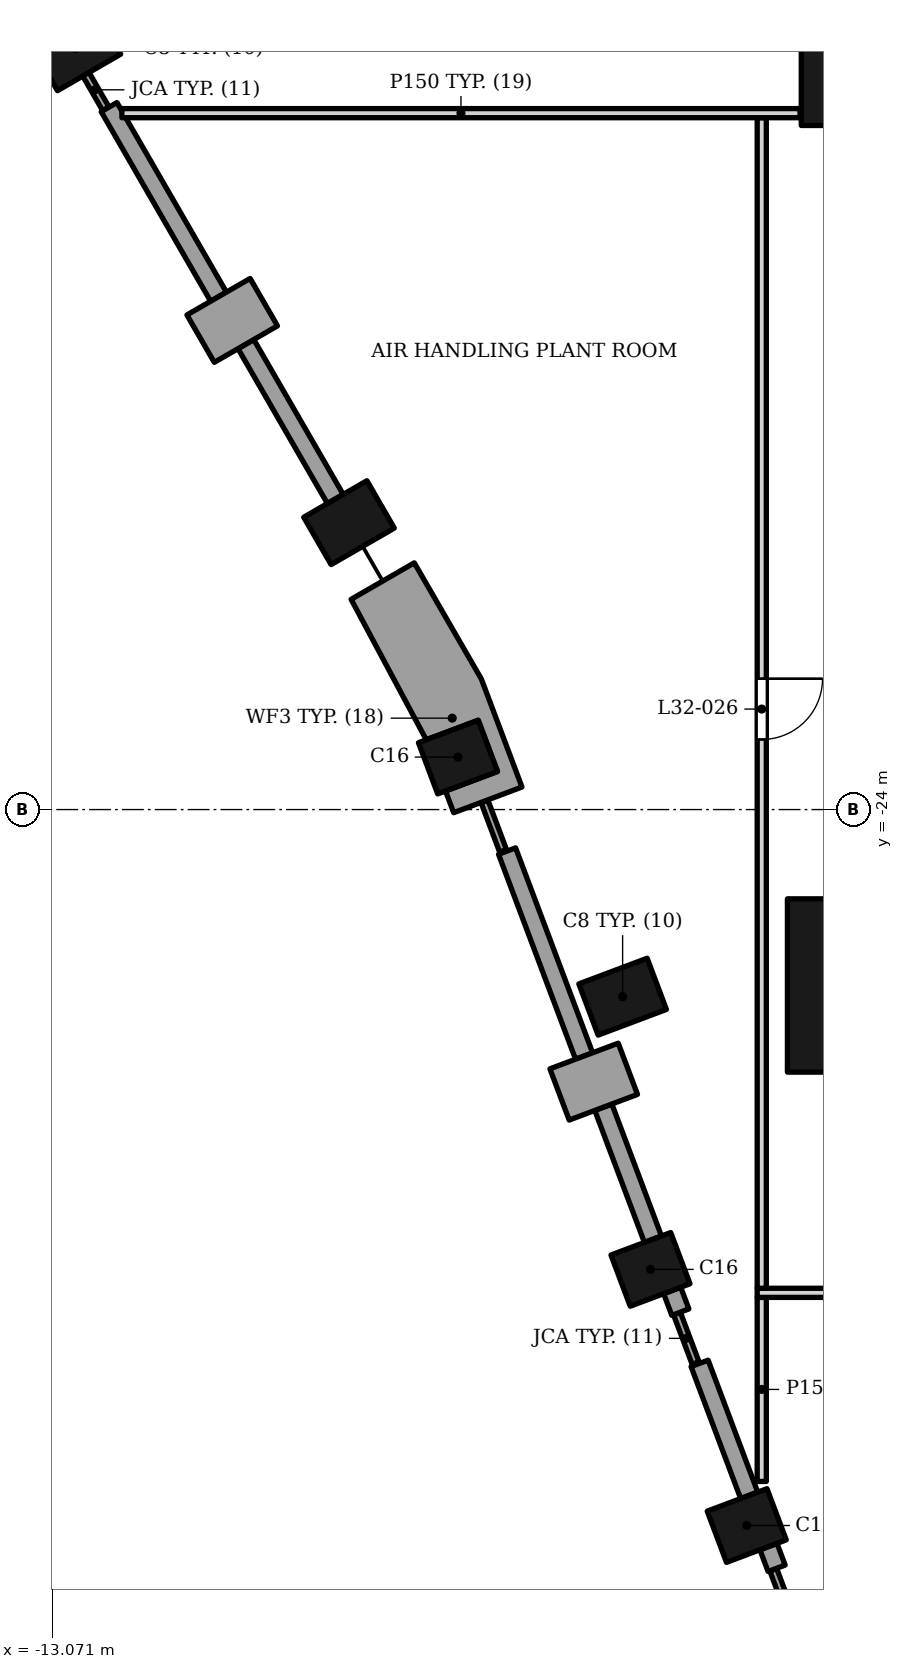
"""IFC4 building model, lengths in metres.
Left out: names, types, materials, properties, quantities, classifications, styles, units other than length and angle.
Written with IfcOpenShell. Run it as: python <this file> out.ifc"""

import sys

from ifc_helpers import new_model, si_unit, direction, frame, frame_2d, origin, origin_2d, place, context, subcontext, project, spatial, polyline, rectangle, outline, extrude, element, fill, save


model = new_model("IFC4")
c1 = context("Model", 3, precision=1e-05, world=origin(), true_north=direction((0.0, 1.0)))
c2 = subcontext(c1, "Body", "Model", "MODEL_VIEW")
j1 = project(units=[si_unit("LENGTHUNIT", "METRE"), si_unit("PLANEANGLEUNIT", "RADIAN")], contexts=[c1])
p1 = place(None, origin())
s1 = spatial("IfcSite", under=j1, at=p1, CompositionType="ELEMENT")
p2 = place(p1, origin())
s2 = spatial("IfcBuilding", under=s1, at=p2, CompositionType="ELEMENT")
p3 = place(p2, frame((0.0, 0.0, 139.6)))
s3 = spatial("IfcBuildingStorey", under=s2, at=p3, CompositionType="ELEMENT", Elevation=139.6)
for number, where, z_axis, x_axis in (
    (1, (-12.688, -11.488, 0.0), (0.0, 0.0, 1.0), (0.5, -0.866, 0.0)),
    (2, (-8.188, -19.282, 0.0), (0.0, 0.0, 1.0), (0.5, -0.866, 0.0)),
    (3, (-3.688, -27.077, 0.0), (0.0, 0.0, 1.0), (0.352, -0.936, 0.0)),
):
    element("IfcColumn", number, at=place(p3, frame(where, z_axis=z_axis, x_axis=x_axis)), inside=s3, PredefinedType="COLUMN", context=c2, shape_type="SweptSolid", body=[
        extrude(rectangle(XDim=0.9, YDim=1.2, at=origin_2d()), origin(), (0.0, 0.0, 1.0), 5.0),
    ])
p4 = place(p3, frame((0.447, -26.893, 0.0), z_axis=(0.0, 0.0, 1.0), x_axis=(0.0, 1.0, 0.0)))
e4 = element("IfcColumn", 4, at=p4, inside=s3, PredefinedType="COLUMN", context=c2, shape_type="SweptSolid", body=[
    extrude(rectangle(XDim=2.85, YDim=2.85, at=origin_2d()), origin(), (0.0, 0.0, 1.0), 5.0),
])
p5 = place(p3, frame((0.0, -12.0, 0.0), z_axis=(0.0, 0.0, 1.0), x_axis=(1.0, 0.0, 0.0)))
e5 = element("IfcColumn", 5, at=p5, inside=s3, PredefinedType="COLUMN", context=c2, shape_type="SweptSolid", body=[
    extrude(rectangle(XDim=1.5, YDim=1.5, at=origin_2d()), origin(), (0.0, 0.0, 1.0), 5.0),
])
for number, where, z_axis, x_axis in (
    (6, (-6.396, -23.137, 0.0), (0.0, 0.0, 1.0), (0.352, -0.936, 0.0)),
    (7, (-3.23, -31.562, 0.0), (0.0, 0.0, 1.0), (0.352, -0.936, 0.0)),
    (8, (-1.647, -35.774, 0.0), (0.0, 0.0, 1.0), (0.352, -0.936, 0.0)),
):
    element("IfcColumn", number, at=place(p3, frame(where, z_axis=z_axis, x_axis=x_axis)), inside=s3, PredefinedType="COLUMN", context=c2, shape_type="SweptSolid", body=[
        extrude(rectangle(XDim=0.9, YDim=1.05, at=origin_2d()), origin(), (0.0, 0.0, 1.0), 5.0),
    ])
p6 = place(p3, frame((-9.589, -15.656, 0.0), z_axis=(0.0, 0.0, 1.0), x_axis=(-0.866043267704, -0.499969057507, 0.0)))
e9 = element("IfcWall", 9, at=p6, inside=s3, PredefinedType="SOLIDWALL", context=c2, shape_type="SweptSolid", body=[
    extrude(rectangle(XDim=1.2, YDim=0.9, at=frame_2d((0.6, 0.0))), origin(), (0.0, 0.0, 1.0), 3.5),
])
p7 = place(p3, frame((-12.134, -12.448, 0.0), z_axis=(0.0, 0.0, 1.0), x_axis=(0.500012057535, -0.866018442252, 0.0)))
e10 = element("IfcWall", 10, at=p7, inside=s3, PredefinedType="ELEMENTEDWALL", context=c2, shape_type="SweptSolid", body=[
    extrude(rectangle(XDim=3.6, YDim=0.3, at=frame_2d((1.8, 0.0))), origin(), (0.0, 0.0, 1.0), 3.5),
])
p8 = place(p3, origin())
e11 = element("IfcWall", 11, at=p8, inside=s3, PredefinedType="ELEMENTEDWALL", context=c2, shape_type="SweptSolid", body=[
    extrude(outline(polyline([(-10.014, -16.42), (-8.543, -18.968), (-8.283, -18.817), (-9.754, -16.271), (-10.014, -16.42)])), origin(), (0.0, 0.0, 1.0), 3.5),
])
p9 = place(p3, frame((-4.725, -28.685, 0.0), z_axis=(0.0, 0.0, 1.0), x_axis=(0.936086483131, 0.351769947693, 0.0)))
e12 = element("IfcWall", 12, at=p9, inside=s3, PredefinedType="SOLIDWALL", context=c2, shape_type="SweptSolid", body=[
    extrude(rectangle(XDim=1.2, YDim=0.9, at=frame_2d((0.6, 0.0))), origin(), (0.0, 0.0, 1.0), 3.5),
])
p10 = place(p3, frame((-5.589, -24.683, 0.0), z_axis=(0.0, 0.0, 1.0), x_axis=(0.351851706772, -0.936055754986, 0.0)))
e13 = element("IfcWall", 13, at=p10, inside=s3, PredefinedType="ELEMENTEDWALL", context=c2, shape_type="SweptSolid", body=[
    extrude(rectangle(XDim=3.6, YDim=0.3, at=frame_2d((1.8, 0.0))), origin(), (0.0, 0.0, 1.0), 3.5),
])
p11 = place(p3, origin())
e14 = element("IfcWall", 14, at=p11, inside=s3, PredefinedType="ELEMENTEDWALL", context=c2, shape_type="SweptSolid", body=[
    extrude(outline(polyline([(-4.146, -28.948), (-3.33, -31.119), (-3.049, -31.013), (-3.865, -28.843), (-4.146, -28.948)])), origin(), (0.0, 0.0, 1.0), 3.5),
])
p12 = place(p3, origin())
e15 = element("IfcWall", 15, at=p12, inside=s3, PredefinedType="ELEMENTEDWALL", context=c2, shape_type="SweptSolid", body=[
    extrude(outline(polyline([(-2.598, -32.212), (-2.732, -31.856), (-3.013, -31.961), (-2.879, -32.318), (-2.598, -32.212)])), origin(), (0.0, 0.0, 1.0), 3.5),
])
p13 = place(p3, origin())
e16 = element("IfcWall", 16, at=p13, inside=s3, PredefinedType="ELEMENTEDWALL", context=c2, shape_type="SweptSolid", body=[
    extrude(outline(polyline([(-2.562, -33.16), (-1.747, -35.331), (-1.466, -35.225), (-2.282, -33.055), (-2.562, -33.16)])), origin(), (0.0, 0.0, 1.0), 3.5),
])
p14 = place(p3, origin())
e17 = element("IfcWall", 17, at=p14, inside=s3, PredefinedType="ELEMENTEDWALL", context=c2, shape_type="SweptSolid", body=[
    extrude(outline(polyline([(-1.015, -36.425), (-1.149, -36.068), (-1.43, -36.173), (-1.296, -36.53), (-1.015, -36.425)])), origin(), (0.0, 0.0, 1.0), 3.5),
])
p15 = place(p3, origin())
e18 = element("IfcWall", 18, at=p15, inside=s3, PredefinedType="SOLIDWALL", context=c2, shape_type="SweptSolid", body=[
    extrude(outline(polyline([(-7.114, -19.943), (-8.154, -20.542), (-6.918, -22.852), (-6.063, -22.531), (-5.746, -23.374), (-6.601, -23.695), (-6.467, -24.052), (-5.344, -23.629), (-6.011, -21.853), (-7.114, -19.943)])), origin(), (0.0, 0.0, 1.0), 3.5),
])
p16 = place(p3, frame((-12.188, -12.475, 0.0), z_axis=(0.0, 0.0, 1.0), x_axis=(-0.499898722045, 0.866083868743, 0.0)))
e19 = element("IfcWall", 19, at=p16, inside=s3, PredefinedType="SOLIDWALL", context=c2, shape_type="SweptSolid", body=[
    extrude(rectangle(XDim=0.719, YDim=0.12, at=frame_2d((0.36, 0.0))), origin(), (0.0, 0.0, 1.0), 3.5),
])
for number, where, z_axis, x_axis in (
    (20, (-5.96, -23.865, 0.0), (0.0, 0.0, 1.0), (0.352, -0.936, 0.0)),
    (21, (-2.793, -32.29, 0.0), (0.0, 0.0, 1.0), (0.352, -0.936, 0.0)),
):
    element("IfcWall", number, at=place(p3, frame(where, z_axis=z_axis, x_axis=x_axis)), inside=s3, PredefinedType="SOLIDWALL", context=c2, shape_type="SweptSolid", body=[
        extrude(rectangle(XDim=0.868, YDim=0.12, at=frame_2d((0.434, 0.0))), origin(), (0.0, 0.0, 1.0), 3.5),
    ])
p17 = place(p3, frame((-1.21, -36.502, 0.0), z_axis=(0.0, 0.0, 1.0), x_axis=(0.351957262509, -0.936016071105, 0.0)))
e22 = element("IfcWall", 22, at=p17, inside=s3, PredefinedType="SOLIDWALL", context=c2, shape_type="SweptSolid", body=[
    extrude(rectangle(XDim=0.898, YDim=0.12, at=frame_2d((0.449, 0.0))), origin(), (0.0, 0.0, 1.0), 3.5),
])
p18 = place(p3, frame((-1.4, -35.05, 0.0), z_axis=(0.0, 0.0, 1.0), x_axis=(0.0, 1.0, 0.0)))
e23 = element("IfcWall", 23, at=p18, inside=s3, PredefinedType="PARTITIONING", context=c2, shape_type="SweptSolid", body=[
    extrude(rectangle(XDim=3.027, YDim=0.15, at=frame_2d((1.514, 0.0))), origin(), (0.0, 0.0, 1.0), 4.13),
])
p19 = place(p3, frame((-1.475, -31.948, 0.0), z_axis=(0.0, 0.0, 1.0), x_axis=(1.0, 0.0, 0.0)))
e24 = element("IfcWall", 24, at=p19, inside=s3, PredefinedType="PARTITIONING", context=c2, shape_type="SweptSolid", body=[
    extrude(rectangle(XDim=5.082, YDim=0.15, at=frame_2d((2.541, 0.0))), origin(), (0.0, 0.0, 1.0), 4.13),
])
p20 = place(p3, frame((-1.4, -31.872, 0.0), z_axis=(0.0, 0.0, 1.0), x_axis=(0.0, 1.0, 0.0)))
e25 = element("IfcWall", 25, at=p20, inside=s3, PredefinedType="PARTITIONING", context=c2, shape_type="SweptSolid", body=[
    extrude(rectangle(XDim=19.25, YDim=0.15, at=frame_2d((9.625, 0.0))), origin(), (0.0, 0.0, 1.0), 4.05),
])
p21 = place(p20, frame((9.025, 0.0, 0.0)))
e26 = element("IfcOpeningElement", 26, at=p21, cuts=e25, PredefinedType="OPENING", context=c2, shape_type="SweptSolid", body=[
    extrude(rectangle(XDim=1.0, YDim=2.1, at=frame_2d((0.5, 1.05))), frame((0.0, 0.085, 0.0), z_axis=(0.0, -1.0, 0.0), x_axis=(1.0, 0.0, 0.0)), (0.0, 0.0, 1.0), 0.17),
])
p22 = place(p3, frame((-11.924, -12.547, 0.0), z_axis=(0.0, 0.0, 1.0), x_axis=(1.0, 0.0, 0.0)))
e27 = element("IfcWall", 27, at=p22, inside=s3, PredefinedType="PARTITIONING", context=c2, shape_type="SweptSolid", body=[
    extrude(rectangle(XDim=11.154, YDim=0.15, at=frame_2d((5.577, 0.0))), origin(), (0.0, 0.0, 1.0), 4.13),
])
p23 = place(p21, origin())
e28 = element("IfcDoor", 28, at=p23, inside=s3, OperationType="SINGLE_SWING_RIGHT", PredefinedType="DOOR", context=c2, shape_type="SweptSolid", body=[
    extrude(rectangle(XDim=1.0, YDim=2.1, at=frame_2d((0.5, 1.05))), frame((0.0, 0.025, 0.0), z_axis=(0.0, -1.0, 0.0), x_axis=(1.0, 0.0, 0.0)), (0.0, 0.0, 1.0), 0.05),
])
fill(e26, e28)
save(model, sys.argv[1])
